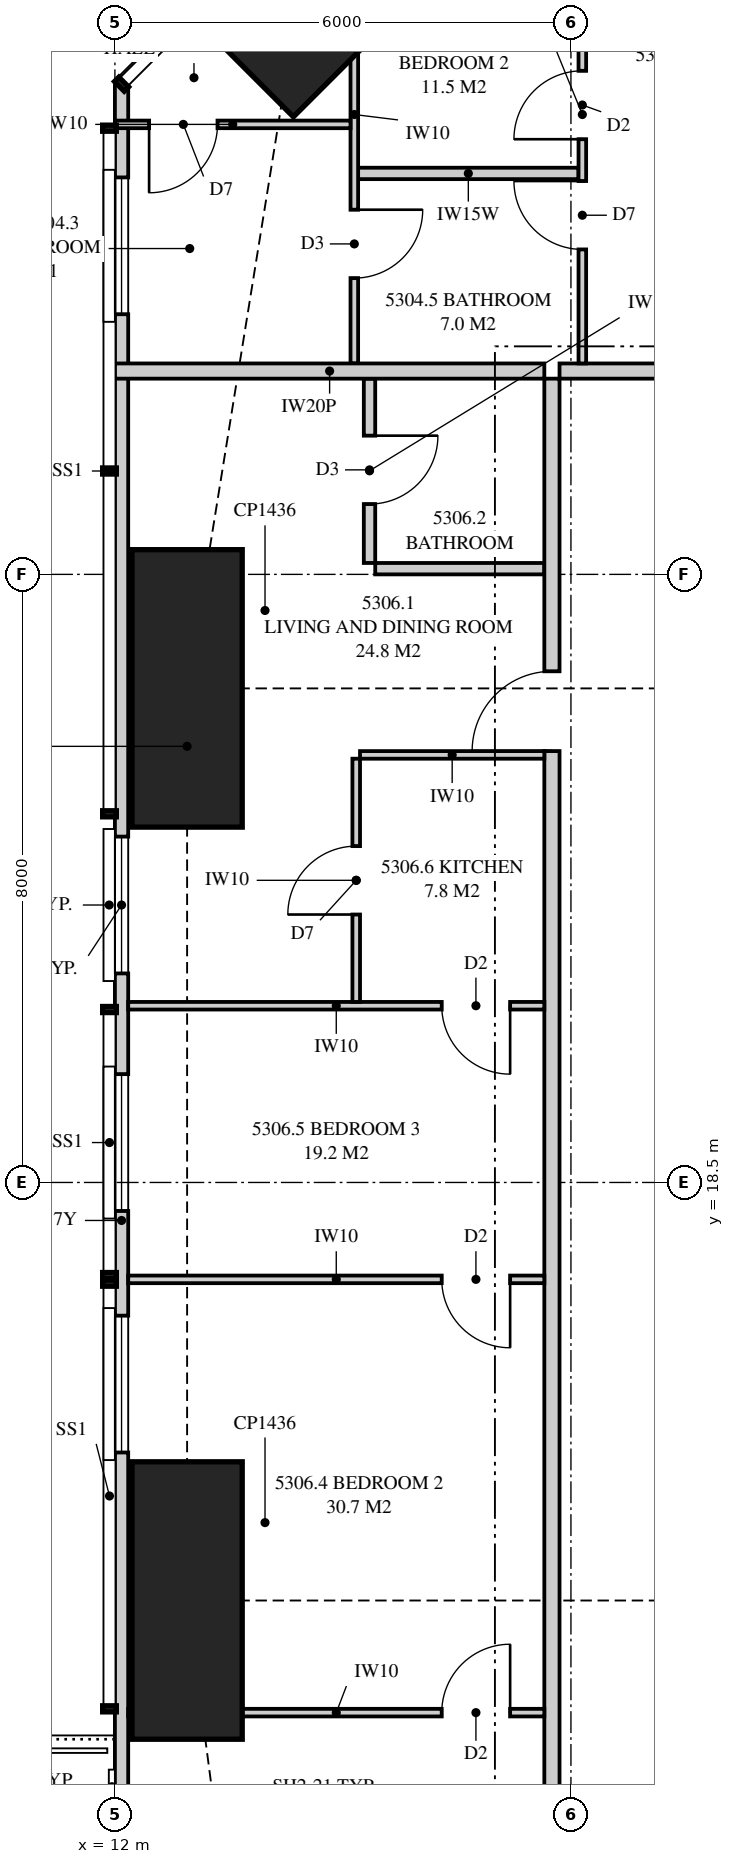
"""IFC4 building model, lengths in metres.
Left out: names, types, materials, properties, quantities, classifications, styles, units other than length and angle.
Written with IfcOpenShell. Run it as: python <this file> out.ifc"""

import sys

from ifc_helpers import new_model, si_unit, direction, frame, frame_2d, origin, origin_2d, place, context, subcontext, project, spatial, polyline, rectangle, outline, extrude, element, fill, save


model = new_model("IFC4")
c1 = context("Model", 3, precision=1e-05, world=origin(), true_north=direction((0.0, 1.0)))
c2 = subcontext(c1, "Body", "Model", "MODEL_VIEW")
j1 = project(units=[si_unit("LENGTHUNIT", "METRE"), si_unit("PLANEANGLEUNIT", "RADIAN")], contexts=[c1])
p1 = place(None, origin())
s1 = spatial("IfcSite", under=j1, at=p1, CompositionType="ELEMENT")
p2 = place(p1, origin())
s2 = spatial("IfcBuilding", under=s1, at=p2, CompositionType="ELEMENT")
p3 = place(p2, frame((0.0, 0.0, 194.55)))
s3 = spatial("IfcBuildingStorey", under=s2, at=p3, CompositionType="ELEMENT", Elevation=194.55)
p4 = place(p3, frame((14.348, 33.652, 0.0), z_axis=(0.0, 0.0, 1.0), x_axis=(0.707106781187, 0.707106781187, 0.0)))
e1 = element("IfcColumn", 1, at=p4, inside=s3, PredefinedType="COLUMN", context=c2, shape_type="SweptSolid", body=[
    extrude(rectangle(XDim=1.6, YDim=1.6, at=origin_2d()), origin(), (0.0, 0.0, 1.0), 3.35),
])
for number, where, z_axis, x_axis in (
    (2, (12.95, 25.0, 0.0), (0.0, 0.0, 1.0), (1.0, 0.0, 0.0)),
    (3, (12.95, 13.0, 0.0), (0.0, 0.0, 1.0), (1.0, 0.0, 0.0)),
):
    element("IfcColumn", number, at=place(p3, frame(where, z_axis=z_axis, x_axis=x_axis)), inside=s3, PredefinedType="COLUMN", context=c2, shape_type="SweptSolid", body=[
        extrude(rectangle(XDim=1.45, YDim=3.65, at=origin_2d()), origin(), (0.0, 0.0, 1.0), 3.35),
    ])
p5 = place(p3, frame((12.087, 32.949, 0.0), z_axis=(0.0, 0.0, 1.0), x_axis=(0.0, -1.0, 0.0)))
e4 = element("IfcWall", 4, at=p5, inside=s3, PredefinedType="SOLIDWALL", context=c2, shape_type="SweptSolid", body=[
    extrude(outline(polyline([(0.0, 0.0), (29.897, 0.0), (29.897, 3.11), (20.191, 3.11), (20.191, 2.15), (20.051, 2.15), (20.051, 3.11), (19.949, 3.11), (19.949, 2.15), (7.949, 2.15), (7.949, 3.11), (7.823, 3.11), (7.823, 2.15), (7.73, 2.15), (7.73, 3.11), (0.0, 3.11), (0.0, 0.0)])), frame((0.0, 0.087, 0.0), z_axis=(0.0, -1.0, 0.0), x_axis=(1.0, 0.0, 0.0)), (0.0, 0.0, 1.0), 0.175),
])
p6 = place(p5, frame((1.226, 0.0, 0.4)))
e5 = element("IfcOpeningElement", 5, at=p6, cuts=e4, PredefinedType="OPENING", context=c2, shape_type="SweptSolid", body=[
    extrude(rectangle(XDim=1.8, YDim=1.7, at=frame_2d((0.9, 0.85))), frame((0.0, 0.097, 0.0), z_axis=(0.0, -1.0, 0.0), x_axis=(1.0, 0.0, 0.0)), (0.0, 0.0, 1.0), 0.195),
])
p7 = place(p5, frame((9.899, 0.0, 0.4)))
e6 = element("IfcOpeningElement", 6, at=p7, cuts=e4, PredefinedType="OPENING", context=c2, shape_type="SweptSolid", body=[
    extrude(rectangle(XDim=1.8, YDim=1.7, at=frame_2d((0.9, 0.85))), frame((0.0, 0.097, 0.0), z_axis=(0.0, -1.0, 0.0), x_axis=(1.0, 0.0, 0.0)), (0.0, 0.0, 1.0), 0.195),
])
p8 = place(p5, frame((13.024, 0.0, 0.4)))
e7 = element("IfcOpeningElement", 7, at=p8, cuts=e4, PredefinedType="OPENING", context=c2, shape_type="SweptSolid", body=[
    extrude(rectangle(XDim=1.8, YDim=1.7, at=frame_2d((0.9, 0.85))), frame((0.0, 0.097, 0.0), z_axis=(0.0, -1.0, 0.0), x_axis=(1.0, 0.0, 0.0)), (0.0, 0.0, 1.0), 0.195),
])
p9 = place(p5, frame((16.201, 0.0, 0.4)))
e8 = element("IfcOpeningElement", 8, at=p9, cuts=e4, PredefinedType="OPENING", context=c2, shape_type="SweptSolid", body=[
    extrude(rectangle(XDim=1.8, YDim=1.7, at=frame_2d((0.9, 0.85))), frame((0.0, 0.097, 0.0), z_axis=(0.0, -1.0, 0.0), x_axis=(1.0, 0.0, 0.0)), (0.0, 0.0, 1.0), 0.195),
])
p10 = place(p5, frame((22.624, 0.0, 0.0)))
e9 = element("IfcOpeningElement", 9, at=p10, cuts=e4, PredefinedType="OPENING", context=c2, shape_type="SweptSolid", body=[
    extrude(rectangle(XDim=1.8, YDim=2.1, at=frame_2d((0.9, 1.05))), frame((0.0, 0.097, 0.0), z_axis=(0.0, -1.0, 0.0), x_axis=(1.0, 0.0, 0.0)), (0.0, 0.0, 1.0), 0.195),
])
p11 = place(p5, frame((26.099, 0.0, 0.4)))
e10 = element("IfcOpeningElement", 10, at=p11, cuts=e4, PredefinedType="OPENING", context=c2, shape_type="SweptSolid", body=[
    extrude(rectangle(XDim=1.2, YDim=1.7, at=frame_2d((0.6, 0.85))), frame((0.0, 0.097, 0.0), z_axis=(0.0, -1.0, 0.0), x_axis=(1.0, 0.0, 0.0)), (0.0, 0.0, 1.0), 0.195),
])
p12 = place(p3, frame((17.85, 29.175, 0.0), z_axis=(0.0, 0.0, 1.0), x_axis=(1.0, 0.0, 0.0)))
e11 = element("IfcWall", 11, at=p12, inside=s3, PredefinedType="PARTITIONING", context=c2, shape_type="SweptSolid", body=[
    extrude(rectangle(XDim=3.9, YDim=0.2, at=frame_2d((1.95, 0.0))), origin(), (0.0, 0.0, 1.0), 3.11),
])
p13 = place(p3, frame((15.15, 35.825, 0.0), z_axis=(0.0, 0.0, 1.0), x_axis=(0.0, -1.0, 0.0)))
e12 = element("IfcWall", 12, at=p13, inside=s3, PredefinedType="PARTITIONING", context=c2, shape_type="SweptSolid", body=[
    extrude(outline(polyline([(0.0, 0.0), (6.55, 0.0), (6.55, 3.11), (2.905, 3.11), (2.905, 2.15), (1.158, 2.15), (1.158, 3.11), (0.0, 3.11), (0.0, 0.0)])), frame((0.0, 0.05, 0.0), z_axis=(0.0, -1.0, 0.0), x_axis=(1.0, 0.0, 0.0)), (0.0, 0.0, 1.0), 0.1),
])
p14 = place(p13, frame((0.355, 0.0, 0.0)))
e13 = element("IfcOpeningElement", 13, at=p14, cuts=e12, PredefinedType="OPENING", context=c2, shape_type="SweptSolid", body=[
    extrude(rectangle(XDim=0.9, YDim=2.1, at=frame_2d((0.45, 1.05))), frame((0.0, 0.06, 0.0), z_axis=(0.0, -1.0, 0.0), x_axis=(1.0, 0.0, 0.0)), (0.0, 0.0, 1.0), 0.12),
])
p15 = place(p13, frame((4.527, 0.0, 0.0)))
e14 = element("IfcOpeningElement", 14, at=p15, cuts=e12, PredefinedType="OPENING", context=c2, shape_type="SweptSolid", body=[
    extrude(rectangle(XDim=0.9, YDim=2.1, at=frame_2d((0.45, 1.05))), frame((0.0, 0.06, 0.0), z_axis=(0.0, -1.0, 0.0), x_axis=(1.0, 0.0, 0.0)), (0.0, 0.0, 1.0), 0.12),
])
p16 = place(p3, frame((18.15, 35.825, 0.0), z_axis=(0.0, 0.0, 1.0), x_axis=(0.0, -1.0, 0.0)))
e15 = element("IfcWall", 15, at=p16, inside=s3, PredefinedType="PARTITIONING", context=c2, shape_type="SweptSolid", body=[
    extrude(outline(polyline([(0.0, 0.0), (6.55, 0.0), (6.55, 3.11), (2.374, 3.11), (2.374, 2.15), (0.627, 2.15), (0.627, 3.11), (0.0, 3.11), (0.0, 0.0)])), frame((0.0, 0.05, 0.0), z_axis=(0.0, -1.0, 0.0), x_axis=(1.0, 0.0, 0.0)), (0.0, 0.0, 1.0), 0.1),
])
p17 = place(p16, frame((2.7, 0.0, 0.0)))
e16 = element("IfcOpeningElement", 16, at=p17, cuts=e15, PredefinedType="OPENING", context=c2, shape_type="SweptSolid", body=[
    extrude(rectangle(XDim=0.9, YDim=2.1, at=frame_2d((0.45, 1.05))), frame((0.0, 0.06, 0.0), z_axis=(0.0, -1.0, 0.0), x_axis=(1.0, 0.0, 0.0)), (0.0, 0.0, 1.0), 0.12),
])
p18 = place(p16, frame((4.15, 0.0, 0.0)))
e17 = element("IfcOpeningElement", 17, at=p18, cuts=e15, PredefinedType="OPENING", context=c2, shape_type="SweptSolid", body=[
    extrude(rectangle(XDim=0.9, YDim=2.1, at=frame_2d((0.45, 1.05))), frame((0.0, 0.06, 0.0), z_axis=(0.0, -1.0, 0.0), x_axis=(1.0, 0.0, 0.0)), (0.0, 0.0, 1.0), 0.12),
])
p19 = place(p3, frame((12.0, 32.42, 0.0), z_axis=(0.0, 0.0, 1.0), x_axis=(1.0, 0.0, 0.0)))
e18 = element("IfcWall", 18, at=p19, inside=s3, PredefinedType="PARTITIONING", context=c2, shape_type="SweptSolid", body=[
    extrude(outline(polyline([(0.0, 0.0), (3.1, 0.0), (3.1, 3.11), (3.021, 3.11), (3.021, 2.15), (1.278, 2.15), (1.278, 3.11), (0.0, 3.11), (0.0, 0.0)])), frame((0.0, 0.05, 0.0), z_axis=(0.0, -1.0, 0.0), x_axis=(1.0, 0.0, 0.0)), (0.0, 0.0, 1.0), 0.1),
])
p20 = place(p19, frame((0.45, 0.0, 0.0)))
e19 = element("IfcOpeningElement", 19, at=p20, cuts=e18, PredefinedType="OPENING", context=c2, shape_type="SweptSolid", body=[
    extrude(rectangle(XDim=0.9, YDim=2.1, at=frame_2d((0.45, 1.05))), frame((0.0, 0.06, 0.0), z_axis=(0.0, -1.0, 0.0), x_axis=(1.0, 0.0, 0.0)), (0.0, 0.0, 1.0), 0.12),
])
p21 = place(p3, frame((15.2, 31.775, 0.0), z_axis=(0.0, 0.0, 1.0), x_axis=(1.0, 0.0, 0.0)))
e20 = element("IfcWall", 20, at=p21, inside=s3, PredefinedType="PLUMBINGWALL", context=c2, shape_type="SweptSolid", body=[
    extrude(rectangle(XDim=2.9, YDim=0.15, at=frame_2d((1.45, 0.0))), origin(), (0.0, 0.0, 1.0), 3.11),
])
p22 = place(p3, frame((12.0, 29.175, 0.0), z_axis=(0.0, 0.0, 1.0), x_axis=(1.0, 0.0, 0.0)))
e21 = element("IfcWall", 21, at=p22, inside=s3, PredefinedType="PARTITIONING", context=c2, shape_type="SweptSolid", body=[
    extrude(outline(polyline([(0.0, 0.0), (5.65, 0.0), (5.65, 3.11), (2.547, 3.11), (2.547, 2.15), (0.703, 2.15), (0.703, 3.11), (0.0, 3.11), (0.0, 0.0)])), frame((0.0, 0.1, 0.0), z_axis=(0.0, -1.0, 0.0), x_axis=(1.0, 0.0, 0.0)), (0.0, 0.0, 1.0), 0.2),
])
p23 = place(p3, frame((17.75, 7.925, 0.0), z_axis=(0.0, 0.0, 1.0), x_axis=(0.0, 1.0, 0.0)))
e22 = element("IfcWall", 22, at=p23, inside=s3, PredefinedType="PARTITIONING", context=c2, shape_type="SweptSolid", body=[
    extrude(outline(polyline([(0.0, 0.0), (21.15, 0.0), (21.15, 3.11), (17.412, 3.11), (17.412, 2.541), (16.738, 2.541), (16.738, 3.11), (5.412, 3.11), (5.412, 2.541), (4.738, 2.541), (4.738, 3.11), (0.0, 3.11), (0.0, 0.0)])), frame((0.0, 0.1, 0.0), z_axis=(0.0, -1.0, 0.0), x_axis=(1.0, 0.0, 0.0)), (0.0, 0.0, 1.0), 0.2),
])
p24 = place(p23, frame((16.25, 0.0, 0.0)))
e23 = element("IfcOpeningElement", 23, at=p24, cuts=e22, PredefinedType="OPENING", context=c2, shape_type="SweptSolid", body=[
    extrude(rectangle(XDim=1.05, YDim=2.2, at=frame_2d((0.525, 1.1))), frame((0.0, 0.11, 0.0), z_axis=(0.0, -1.0, 0.0), x_axis=(1.0, 0.0, 0.0)), (0.0, 0.0, 1.0), 0.22),
])
p25 = place(p3, frame((15.35, 26.65, 0.0), z_axis=(0.0, 0.0, 1.0), x_axis=(0.0, 1.0, 0.0)))
e24 = element("IfcWall", 24, at=p25, inside=s3, PredefinedType="PLUMBINGWALL", context=c2, shape_type="SweptSolid", body=[
    extrude(rectangle(XDim=2.425, YDim=0.15, at=frame_2d((1.212, 0.0))), origin(), (0.0, 0.0, 1.0), 3.11),
])
p26 = place(p25, frame((0.775, 0.0, 0.0)))
e25 = element("IfcOpeningElement", 25, at=p26, cuts=e24, PredefinedType="OPENING", context=c2, shape_type="SweptSolid", body=[
    extrude(rectangle(XDim=0.9, YDim=2.1, at=frame_2d((0.45, 1.05))), frame((0.0, 0.085, 0.0), z_axis=(0.0, -1.0, 0.0), x_axis=(1.0, 0.0, 0.0)), (0.0, 0.0, 1.0), 0.17),
])
p27 = place(p3, frame((15.425, 26.575, 0.0), z_axis=(0.0, 0.0, 1.0), x_axis=(1.0, 0.0, 0.0)))
e26 = element("IfcWall", 26, at=p27, inside=s3, PredefinedType="PLUMBINGWALL", context=c2, shape_type="SweptSolid", body=[
    extrude(rectangle(XDim=2.225, YDim=0.15, at=frame_2d((1.112, 0.0))), origin(), (0.0, 0.0, 1.0), 3.11),
])
p28 = place(p3, frame((12.175, 11.525, 0.0), z_axis=(0.0, 0.0, 1.0), x_axis=(1.0, 0.0, 0.0)))
e27 = element("IfcWall", 27, at=p28, inside=s3, PredefinedType="PARTITIONING", context=c2, shape_type="SweptSolid", body=[
    extrude(outline(polyline([(0.0, 0.0), (5.475, 0.0), (5.475, 3.11), (1.836, 3.11), (1.836, 2.15), (0.101, 2.15), (0.101, 3.11), (0.0, 3.11), (0.0, 0.0)])), frame((0.0, 0.05, 0.0), z_axis=(0.0, -1.0, 0.0), x_axis=(1.0, 0.0, 0.0)), (0.0, 0.0, 1.0), 0.1),
])
p29 = place(p28, frame((4.125, 0.0, 0.0)))
e28 = element("IfcOpeningElement", 28, at=p29, cuts=e27, PredefinedType="OPENING", context=c2, shape_type="SweptSolid", body=[
    extrude(rectangle(XDim=0.9, YDim=2.1, at=frame_2d((0.45, 1.05))), frame((0.0, 0.06, 0.0), z_axis=(0.0, -1.0, 0.0), x_axis=(1.0, 0.0, 0.0)), (0.0, 0.0, 1.0), 0.12),
])
p30 = place(p3, frame((12.175, 17.225, 0.0), z_axis=(0.0, 0.0, 1.0), x_axis=(1.0, 0.0, 0.0)))
e29 = element("IfcWall", 29, at=p30, inside=s3, PredefinedType="PARTITIONING", context=c2, shape_type="SweptSolid", body=[
    extrude(outline(polyline([(0.0, 0.0), (5.475, 0.0), (5.475, 3.11), (1.635, 3.11), (1.635, 2.15), (0.0, 2.15), (0.0, 3.11), (0.0, 0.0)])), frame((0.0, 0.05, 0.0), z_axis=(0.0, -1.0, 0.0), x_axis=(1.0, 0.0, 0.0)), (0.0, 0.0, 1.0), 0.1),
])
p31 = place(p30, frame((4.125, 0.0, 0.0)))
e30 = element("IfcOpeningElement", 30, at=p31, cuts=e29, PredefinedType="OPENING", context=c2, shape_type="SweptSolid", body=[
    extrude(rectangle(XDim=0.9, YDim=2.1, at=frame_2d((0.45, 1.05))), frame((0.0, 0.06, 0.0), z_axis=(0.0, -1.0, 0.0), x_axis=(1.0, 0.0, 0.0)), (0.0, 0.0, 1.0), 0.12),
])
p32 = place(p3, frame((12.175, 20.825, 0.0), z_axis=(0.0, 0.0, 1.0), x_axis=(1.0, 0.0, 0.0)))
e31 = element("IfcWall", 31, at=p32, inside=s3, PredefinedType="PARTITIONING", context=c2, shape_type="SweptSolid", body=[
    extrude(outline(polyline([(0.0, 0.0), (5.475, 0.0), (5.475, 3.11), (1.635, 3.11), (1.635, 2.15), (0.0, 2.15), (0.0, 3.11), (0.0, 0.0)])), frame((0.0, 0.05, 0.0), z_axis=(0.0, -1.0, 0.0), x_axis=(1.0, 0.0, 0.0)), (0.0, 0.0, 1.0), 0.1),
])
p33 = place(p32, frame((4.125, 0.0, 0.0)))
e32 = element("IfcOpeningElement", 32, at=p33, cuts=e31, PredefinedType="OPENING", context=c2, shape_type="SweptSolid", body=[
    extrude(rectangle(XDim=0.9, YDim=2.1, at=frame_2d((0.45, 1.05))), frame((0.0, 0.06, 0.0), z_axis=(0.0, -1.0, 0.0), x_axis=(1.0, 0.0, 0.0)), (0.0, 0.0, 1.0), 0.12),
])
p34 = place(p3, frame((15.175, 20.875, 0.0), z_axis=(0.0, 0.0, 1.0), x_axis=(0.0, 1.0, 0.0)))
e33 = element("IfcWall", 33, at=p34, inside=s3, PredefinedType="PARTITIONING", context=c2, shape_type="SweptSolid", body=[
    extrude(rectangle(XDim=3.2, YDim=0.1, at=frame_2d((1.6, 0.0))), origin(), (0.0, 0.0, 1.0), 3.11),
])
p35 = place(p34, frame((1.15, 0.0, 0.0)))
e34 = element("IfcOpeningElement", 34, at=p35, cuts=e33, PredefinedType="OPENING", context=c2, shape_type="SweptSolid", body=[
    extrude(rectangle(XDim=0.9, YDim=2.1, at=frame_2d((0.45, 1.05))), frame((0.0, 0.06, 0.0), z_axis=(0.0, -1.0, 0.0), x_axis=(1.0, 0.0, 0.0)), (0.0, 0.0, 1.0), 0.12),
])
p36 = place(p3, frame((15.225, 24.125, 0.0), z_axis=(0.0, 0.0, 1.0), x_axis=(1.0, 0.0, 0.0)))
e35 = element("IfcWall", 35, at=p36, inside=s3, PredefinedType="PARTITIONING", context=c2, shape_type="SweptSolid", body=[
    extrude(rectangle(XDim=2.425, YDim=0.1, at=frame_2d((1.212, 0.0))), origin(), (0.0, 0.0, 1.0), 3.11),
])
p37 = place(p6, origin())
e36 = element("IfcWindow", 36, at=p37, inside=s3, PartitioningType="SINGLE_PANEL", PredefinedType="WINDOW", context=c2, shape_type="SweptSolid", body=[
    extrude(rectangle(XDim=1.8, YDim=1.7, at=frame_2d((0.9, 0.85))), frame((0.0, 0.03, 0.0), z_axis=(0.0, -1.0, 0.0), x_axis=(1.0, 0.0, 0.0)), (0.0, 0.0, 1.0), 0.06),
])
fill(e5, e36)
p38 = place(p7, origin())
e37 = element("IfcWindow", 37, at=p38, inside=s3, PartitioningType="SINGLE_PANEL", PredefinedType="WINDOW", context=c2, shape_type="SweptSolid", body=[
    extrude(rectangle(XDim=1.8, YDim=1.7, at=frame_2d((0.9, 0.85))), frame((0.0, 0.03, 0.0), z_axis=(0.0, -1.0, 0.0), x_axis=(1.0, 0.0, 0.0)), (0.0, 0.0, 1.0), 0.06),
])
fill(e6, e37)
p39 = place(p8, origin())
e38 = element("IfcWindow", 38, at=p39, inside=s3, PartitioningType="SINGLE_PANEL", PredefinedType="WINDOW", context=c2, shape_type="SweptSolid", body=[
    extrude(rectangle(XDim=1.8, YDim=1.7, at=frame_2d((0.9, 0.85))), frame((0.0, 0.03, 0.0), z_axis=(0.0, -1.0, 0.0), x_axis=(1.0, 0.0, 0.0)), (0.0, 0.0, 1.0), 0.06),
])
fill(e7, e38)
p40 = place(p9, origin())
e39 = element("IfcWindow", 39, at=p40, inside=s3, PartitioningType="SINGLE_PANEL", PredefinedType="WINDOW", context=c2, shape_type="SweptSolid", body=[
    extrude(rectangle(XDim=1.8, YDim=1.7, at=frame_2d((0.9, 0.85))), frame((0.0, 0.03, 0.0), z_axis=(0.0, -1.0, 0.0), x_axis=(1.0, 0.0, 0.0)), (0.0, 0.0, 1.0), 0.06),
])
fill(e8, e39)
p41 = place(p20, frame((0.9, 0.0, 0.0), z_axis=(0.0, 0.0, 1.0), x_axis=(-1.0, 0.0, 0.0)))
e40 = element("IfcDoor", 40, at=p41, inside=s3, OperationType="SINGLE_SWING_RIGHT", PredefinedType="DOOR", context=c2, shape_type="SweptSolid", body=[
    extrude(rectangle(XDim=0.9, YDim=2.1, at=frame_2d((0.45, 1.05))), frame((0.0, 0.025, 0.0), z_axis=(0.0, -1.0, 0.0), x_axis=(1.0, 0.0, 0.0)), (0.0, 0.0, 1.0), 0.05),
])
fill(e19, e40)
p42 = place(p17, frame((0.9, 0.0, 0.0), z_axis=(0.0, 0.0, 1.0), x_axis=(-1.0, 0.0, 0.0)))
e41 = element("IfcDoor", 41, at=p42, inside=s3, OperationType="SINGLE_SWING_LEFT", PredefinedType="DOOR", context=c2, shape_type="SweptSolid", body=[
    extrude(rectangle(XDim=0.9, YDim=2.1, at=frame_2d((0.45, 1.05))), frame((0.0, 0.025, 0.0), z_axis=(0.0, -1.0, 0.0), x_axis=(1.0, 0.0, 0.0)), (0.0, 0.0, 1.0), 0.05),
])
fill(e16, e41)
p43 = place(p18, frame((0.9, 0.0, 0.0), z_axis=(0.0, 0.0, 1.0), x_axis=(-1.0, 0.0, 0.0)))
e42 = element("IfcDoor", 42, at=p43, inside=s3, OperationType="SINGLE_SWING_RIGHT", PredefinedType="DOOR", context=c2, shape_type="SweptSolid", body=[
    extrude(rectangle(XDim=0.9, YDim=2.1, at=frame_2d((0.45, 1.05))), frame((0.0, 0.025, 0.0), z_axis=(0.0, -1.0, 0.0), x_axis=(1.0, 0.0, 0.0)), (0.0, 0.0, 1.0), 0.05),
])
fill(e17, e42)
p44 = place(p15, origin())
e43 = element("IfcDoor", 43, at=p44, inside=s3, OperationType="SINGLE_SWING_LEFT", PredefinedType="DOOR", context=c2, shape_type="SweptSolid", body=[
    extrude(rectangle(XDim=0.9, YDim=2.1, at=frame_2d((0.45, 1.05))), frame((0.0, 0.025, 0.0), z_axis=(0.0, -1.0, 0.0), x_axis=(1.0, 0.0, 0.0)), (0.0, 0.0, 1.0), 0.05),
])
fill(e14, e43)
p45 = place(p24, origin())
e44 = element("IfcDoor", 44, at=p45, inside=s3, OperationType="SINGLE_SWING_LEFT", PredefinedType="DOOR", context=c2, shape_type="SweptSolid", body=[
    extrude(rectangle(XDim=1.05, YDim=2.2, at=frame_2d((0.525, 1.1))), frame((0.0, 0.025, 0.0), z_axis=(0.0, -1.0, 0.0), x_axis=(1.0, 0.0, 0.0)), (0.0, 0.0, 1.0), 0.05),
])
fill(e23, e44)
p46 = place(p26, frame((0.9, 0.0, 0.0), z_axis=(0.0, 0.0, 1.0), x_axis=(-1.0, 0.0, 0.0)))
e45 = element("IfcDoor", 45, at=p46, inside=s3, OperationType="SINGLE_SWING_LEFT", PredefinedType="DOOR", context=c2, shape_type="SweptSolid", body=[
    extrude(rectangle(XDim=0.9, YDim=2.1, at=frame_2d((0.45, 1.05))), frame((0.0, 0.025, 0.0), z_axis=(0.0, -1.0, 0.0), x_axis=(1.0, 0.0, 0.0)), (0.0, 0.0, 1.0), 0.05),
])
fill(e25, e45)
p47 = place(p29, origin())
e46 = element("IfcDoor", 46, at=p47, inside=s3, OperationType="SINGLE_SWING_RIGHT", PredefinedType="DOOR", context=c2, shape_type="SweptSolid", body=[
    extrude(rectangle(XDim=0.9, YDim=2.1, at=frame_2d((0.45, 1.05))), frame((0.0, 0.025, 0.0), z_axis=(0.0, -1.0, 0.0), x_axis=(1.0, 0.0, 0.0)), (0.0, 0.0, 1.0), 0.05),
])
fill(e28, e46)
p48 = place(p31, frame((0.9, 0.0, 0.0), z_axis=(0.0, 0.0, 1.0), x_axis=(-1.0, 0.0, 0.0)))
e47 = element("IfcDoor", 47, at=p48, inside=s3, OperationType="SINGLE_SWING_LEFT", PredefinedType="DOOR", context=c2, shape_type="SweptSolid", body=[
    extrude(rectangle(XDim=0.9, YDim=2.1, at=frame_2d((0.45, 1.05))), frame((0.0, 0.025, 0.0), z_axis=(0.0, -1.0, 0.0), x_axis=(1.0, 0.0, 0.0)), (0.0, 0.0, 1.0), 0.05),
])
fill(e30, e47)
p49 = place(p33, frame((0.9, 0.0, 0.0), z_axis=(0.0, 0.0, 1.0), x_axis=(-1.0, 0.0, 0.0)))
e48 = element("IfcDoor", 48, at=p49, inside=s3, OperationType="SINGLE_SWING_LEFT", PredefinedType="DOOR", context=c2, shape_type="SweptSolid", body=[
    extrude(rectangle(XDim=0.9, YDim=2.1, at=frame_2d((0.45, 1.05))), frame((0.0, 0.025, 0.0), z_axis=(0.0, -1.0, 0.0), x_axis=(1.0, 0.0, 0.0)), (0.0, 0.0, 1.0), 0.05),
])
fill(e32, e48)
p50 = place(p35, origin())
e49 = element("IfcDoor", 49, at=p50, inside=s3, OperationType="SINGLE_SWING_LEFT", PredefinedType="DOOR", context=c2, shape_type="SweptSolid", body=[
    extrude(rectangle(XDim=0.9, YDim=2.1, at=frame_2d((0.45, 1.05))), frame((0.0, 0.025, 0.0), z_axis=(0.0, -1.0, 0.0), x_axis=(1.0, 0.0, 0.0)), (0.0, 0.0, 1.0), 0.05),
])
fill(e34, e49)
save(model, sys.argv[1])
